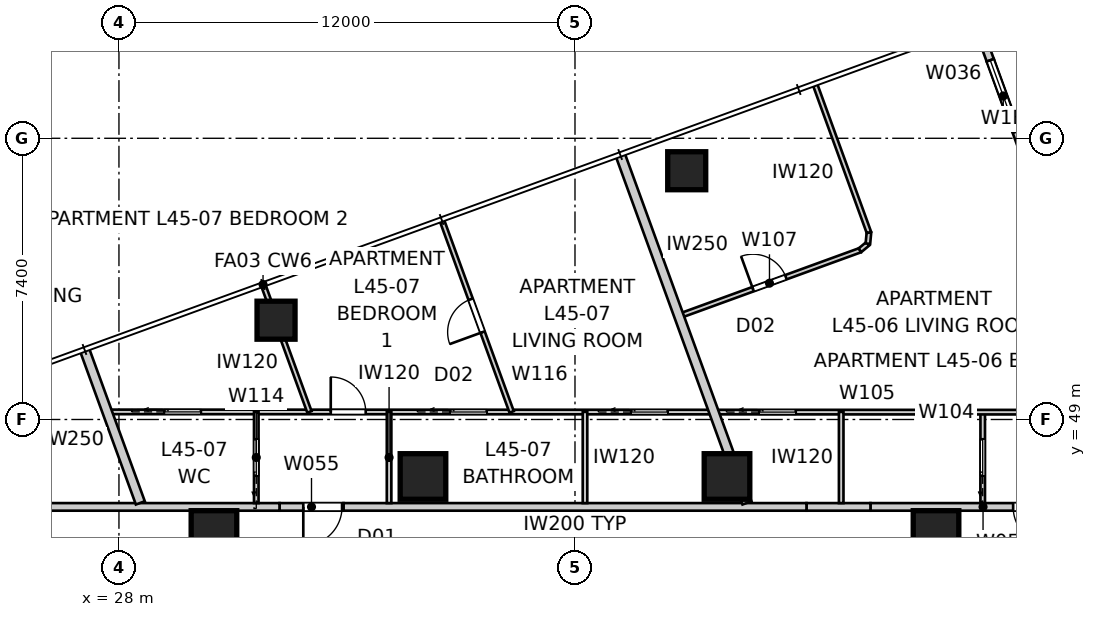
"""IFC4 building model, lengths in metres.
Left out: names, types, materials, properties, quantities, classifications, styles, units other than length and angle.
Written with IfcOpenShell. Run it as: python <this file> out.ifc"""

import sys

from ifc_helpers import new_model, si_unit, direction, frame, frame_2d, origin, origin_2d, place, context, subcontext, project, spatial, rectangle, extrude, element, fill, save


model = new_model("IFC4")
c1 = context("Model", 3, precision=1e-05, world=origin(), true_north=direction((0.0, 1.0)))
c2 = subcontext(c1, "Body", "Model", "MODEL_VIEW")
j1 = project(units=[si_unit("LENGTHUNIT", "METRE"), si_unit("PLANEANGLEUNIT", "RADIAN")], contexts=[c1])
p1 = place(None, origin())
s1 = spatial("IfcSite", under=j1, at=p1, CompositionType="ELEMENT")
p2 = place(p1, origin())
s2 = spatial("IfcBuilding", under=s1, at=p2, CompositionType="ELEMENT")
p3 = place(p2, frame((0.0, 0.0, 164.2)))
s3 = spatial("IfcBuildingStorey", under=s2, at=p3, CompositionType="ELEMENT", Elevation=164.2)
for number, where, z_axis, x_axis in (
    (1, (42.94, 55.546, 0.0), (0.0, 0.0, 1.0), (1.0, 0.0, 0.0)),
    (2, (32.134, 51.613, 0.0), (0.0, 0.0, 1.0), (1.0, 0.0, 0.0)),
):
    element("IfcColumn", number, at=place(p3, frame(where, z_axis=z_axis, x_axis=x_axis)), inside=s3, PredefinedType="COLUMN", context=c2, shape_type="SweptSolid", body=[
        extrude(rectangle(XDim=1.0, YDim=1.0, at=origin_2d()), origin(), (0.0, 0.0, 1.0), 3.4),
    ])
for number, where, z_axis, x_axis in (
    (3, (49.5, 46.0, 0.0), (0.0, 0.0, 1.0), (1.0, 0.0, 0.0)),
    (4, (44.0, 47.5, 0.0), (0.0, 0.0, 1.0), (1.0, 0.0, 0.0)),
    (5, (36.0, 47.5, 0.0), (0.0, 0.0, 1.0), (1.0, 0.0, 0.0)),
    (6, (30.5, 46.0, 0.0), (0.0, 0.0, 1.0), (1.0, 0.0, 0.0)),
):
    element("IfcColumn", number, at=place(p3, frame(where, z_axis=z_axis, x_axis=x_axis)), inside=s3, PredefinedType="COLUMN", context=c2, shape_type="SweptSolid", body=[
        extrude(rectangle(XDim=1.2, YDim=1.2, at=origin_2d()), origin(), (0.0, 0.0, 1.0), 3.4),
    ])
p4 = place(p3, frame((51.953, 55.634, 0.0), z_axis=(0.0, 0.0, 1.0), x_axis=(-0.341965219194, 0.939712609717, 0.0)))
e7 = element("IfcWall", 7, at=p4, inside=s3, PredefinedType="SOLIDWALL", context=c2, shape_type="SweptSolid", body=[
    extrude(rectangle(XDim=3.0, YDim=0.2, at=frame_2d((1.5, 0.0))), origin(), (0.0, 0.0, 1.0), 2.722),
])
p5 = place(p4, frame((1.0, 0.0, 0.45)))
e8 = element("IfcOpeningElement", 8, at=p5, cuts=e7, PredefinedType="OPENING", context=c2, shape_type="SweptSolid", body=[
    extrude(rectangle(XDim=2.0, YDim=1.8, at=frame_2d((1.0, 0.9))), frame((0.0, 0.11, 0.0), z_axis=(0.0, -1.0, 0.0), x_axis=(1.0, 0.0, 0.0)), (0.0, 0.0, 1.0), 0.22),
])
p6 = place(p3, frame((50.927, 58.453, 0.0), z_axis=(0.0, 0.0, 1.0), x_axis=(-0.342037080957, 0.939686455819, 0.0)))
e9 = element("IfcWall", 9, at=p6, inside=s3, PredefinedType="SOLIDWALL", context=c2, shape_type="SweptSolid", body=[
    extrude(rectangle(XDim=1.0, YDim=0.2, at=frame_2d((0.5, 0.0))), origin(), (0.0, 0.0, 1.0), 3.25),
])
p7 = place(p3, frame((53.7, 46.7, 0.0), z_axis=(0.0, 0.0, 1.0), x_axis=(-1.0, 0.0, 0.0)))
e10 = element("IfcWall", 10, at=p7, inside=s3, PredefinedType="PARTITIONING", context=c2, shape_type="SweptSolid", body=[
    extrude(rectangle(XDim=5.925, YDim=0.2, at=frame_2d((2.962, 0.0))), origin(), (0.0, 0.0, 1.0), 3.25),
])
p8 = place(p7, frame((1.151, 0.0, 0.0)))
e11 = element("IfcOpeningElement", 11, at=p8, cuts=e10, PredefinedType="OPENING", context=c2, shape_type="SweptSolid", body=[
    extrude(rectangle(XDim=1.02, YDim=2.34, at=frame_2d((0.51, 1.17))), frame((0.0, 0.11, 0.0), z_axis=(0.0, -1.0, 0.0), x_axis=(1.0, 0.0, 0.0)), (0.0, 0.0, 1.0), 0.22),
])
p9 = place(p3, frame((47.775, 46.7, 0.0), z_axis=(0.0, 0.0, 1.0), x_axis=(-1.0, 0.0, 0.0)))
e12 = element("IfcWall", 12, at=p9, inside=s3, PredefinedType="PARTITIONING", context=c2, shape_type="SweptSolid", body=[
    extrude(rectangle(XDim=1.684, YDim=0.2, at=frame_2d((0.842, 0.0))), origin(), (0.0, 0.0, 1.0), 2.55),
])
p10 = place(p3, frame((46.092, 46.7, 0.0), z_axis=(0.0, 0.0, 1.0), x_axis=(-1.0, 0.0, 0.0)))
e13 = element("IfcWall", 13, at=p10, inside=s3, PredefinedType="PARTITIONING", context=c2, shape_type="SweptSolid", body=[
    extrude(rectangle(XDim=12.183, YDim=0.2, at=frame_2d((6.092, 0.0))), origin(), (0.0, 0.0, 1.0), 3.25),
])
p11 = place(p3, frame((33.908, 46.7, 0.0), z_axis=(0.0, 0.0, 1.0), x_axis=(-1.0, 0.0, 0.0)))
e14 = element("IfcWall", 14, at=p11, inside=s3, PredefinedType="PARTITIONING", context=c2, shape_type="SweptSolid", body=[
    extrude(rectangle(XDim=1.684, YDim=0.2, at=frame_2d((0.842, 0.0))), origin(), (0.0, 0.0, 1.0), 2.55),
])
p12 = place(p11, frame((0.038, 0.0, 0.0)))
e15 = element("IfcOpeningElement", 15, at=p12, cuts=e14, PredefinedType="OPENING", context=c2, shape_type="SweptSolid", body=[
    extrude(rectangle(XDim=1.02, YDim=2.34, at=frame_2d((0.51, 1.17))), frame((0.0, 0.11, 0.0), z_axis=(0.0, -1.0, 0.0), x_axis=(1.0, 0.0, 0.0)), (0.0, 0.0, 1.0), 0.22),
])
p13 = place(p3, frame((32.225, 46.7, 0.0), z_axis=(0.0, 0.0, 1.0), x_axis=(-1.0, 0.0, 0.0)))
e16 = element("IfcWall", 16, at=p13, inside=s3, PredefinedType="PARTITIONING", context=c2, shape_type="SweptSolid", body=[
    extrude(rectangle(XDim=6.725, YDim=0.2, at=frame_2d((3.362, 0.0))), origin(), (0.0, 0.0, 1.0), 3.25),
])
p14 = place(p3, frame((41.188, 55.973, 0.0), z_axis=(0.0, 0.0, 1.0), x_axis=(0.342010282049, -0.939696209938, 0.0)))
e17 = element("IfcWall", 17, at=p14, inside=s3, PredefinedType="PARTITIONING", context=c2, shape_type="SweptSolid", body=[
    extrude(rectangle(XDim=9.756, YDim=0.25, at=frame_2d((4.878, 0.0))), origin(), (0.0, 0.0, 1.0), 3.25),
])
p15 = place(p3, frame((27.093, 50.843, 0.0), z_axis=(0.0, 0.0, 1.0), x_axis=(0.3420213594, -0.93969217817, 0.0)))
e18 = element("IfcWall", 18, at=p15, inside=s3, PredefinedType="PARTITIONING", context=c2, shape_type="SweptSolid", body=[
    extrude(rectangle(XDim=4.296, YDim=0.25, at=frame_2d((2.148, 0.0))), origin(), (0.0, 0.0, 1.0), 3.25),
])
p16 = place(p3, frame((50.729, 46.8, 0.0), z_axis=(0.0, 0.0, 1.0), x_axis=(0.0, 1.0, 0.0)))
e19 = element("IfcWall", 19, at=p16, inside=s3, PredefinedType="PARTITIONING", context=c2, shape_type="SweptSolid", body=[
    extrude(rectangle(XDim=2.4, YDim=0.12, at=frame_2d((1.2, 0.0))), origin(), (0.0, 0.0, 1.0), 3.25),
])
p17 = place(p16, frame((0.72, 0.0, 0.0)))
e20 = element("IfcOpeningElement", 20, at=p17, cuts=e19, PredefinedType="OPENING", context=c2, shape_type="SweptSolid", body=[
    extrude(rectangle(XDim=0.96, YDim=2.1, at=frame_2d((0.48, 1.05))), frame((0.0, 0.07, 0.0), z_axis=(0.0, -1.0, 0.0), x_axis=(1.0, 0.0, 0.0)), (0.0, 0.0, 1.0), 0.14),
])
p18 = place(p3, frame((27.691, 49.2, 0.0), z_axis=(0.0, 0.0, 1.0), x_axis=(0.999999952285, -0.000308918217, 0.0)))
e21 = element("IfcWall", 21, at=p18, inside=s3, PredefinedType="PARTITIONING", context=c2, shape_type="SweptSolid", body=[
    extrude(rectangle(XDim=30.822, YDim=0.12, at=frame_2d((15.411, 0.0))), origin(), (0.0, 0.0, 1.0), 3.25),
])
p19 = place(p18, frame((5.882, 0.0, 0.0)))
e22 = element("IfcOpeningElement", 22, at=p19, cuts=e21, PredefinedType="OPENING", context=c2, shape_type="SweptSolid", body=[
    extrude(rectangle(XDim=0.92, YDim=2.34, at=frame_2d((0.46, 1.17))), frame((0.0, 0.07, 0.0), z_axis=(0.0, -1.0, 0.0), x_axis=(1.0, 0.0, 0.0)), (0.0, 0.0, 1.0), 0.14),
])
p20 = place(p18, frame((28.07, 0.0, 0.0)))
e23 = element("IfcOpeningElement", 23, at=p20, cuts=e21, PredefinedType="OPENING", context=c2, shape_type="SweptSolid", body=[
    extrude(rectangle(XDim=0.92, YDim=2.34, at=frame_2d((0.46, 1.17))), frame((0.0, 0.07, 0.0), z_axis=(0.0, -1.0, 0.0), x_axis=(1.0, 0.0, 0.0)), (0.0, 0.0, 1.0), 0.14),
])
p21 = place(p18, frame((24.388, 0.0, 0.0)))
e24 = element("IfcOpeningElement", 24, at=p21, cuts=e21, PredefinedType="OPENING", context=c2, shape_type="SweptSolid", body=[
    extrude(rectangle(XDim=0.92, YDim=2.34, at=frame_2d((0.46, 1.17))), frame((0.0, 0.07, 0.0), z_axis=(0.0, -1.0, 0.0), x_axis=(1.0, 0.0, 0.0)), (0.0, 0.0, 1.0), 0.14),
])
p22 = place(p18, frame((1.506, 0.0, 0.0)))
e25 = element("IfcOpeningElement", 25, at=p22, cuts=e21, PredefinedType="OPENING", context=c2, shape_type="SweptSolid", body=[
    extrude(rectangle(XDim=0.96, YDim=2.1, at=frame_2d((0.48, 1.05))), frame((0.0, 0.07, 0.0), z_axis=(0.0, -1.0, 0.0), x_axis=(1.0, 0.0, 0.0)), (0.0, 0.0, 1.0), 0.14),
])
p23 = place(p18, frame((17.158, 0.0, 0.0)))
e26 = element("IfcOpeningElement", 26, at=p23, cuts=e21, PredefinedType="OPENING", context=c2, shape_type="SweptSolid", body=[
    extrude(rectangle(XDim=0.96, YDim=2.1, at=frame_2d((0.48, 1.05))), frame((0.0, 0.07, 0.0), z_axis=(0.0, -1.0, 0.0), x_axis=(1.0, 0.0, 0.0)), (0.0, 0.0, 1.0), 0.14),
])
p24 = place(p18, frame((9.026, 0.0, 0.0)))
e27 = element("IfcOpeningElement", 27, at=p24, cuts=e21, PredefinedType="OPENING", context=c2, shape_type="SweptSolid", body=[
    extrude(rectangle(XDim=0.96, YDim=2.1, at=frame_2d((0.48, 1.05))), frame((0.0, 0.07, 0.0), z_axis=(0.0, -1.0, 0.0), x_axis=(1.0, 0.0, 0.0)), (0.0, 0.0, 1.0), 0.14),
])
p25 = place(p18, frame((13.788, 0.0, 0.0)))
e28 = element("IfcOpeningElement", 28, at=p25, cuts=e21, PredefinedType="OPENING", context=c2, shape_type="SweptSolid", body=[
    extrude(rectangle(XDim=0.96, YDim=2.1, at=frame_2d((0.48, 1.05))), frame((0.0, 0.07, 0.0), z_axis=(0.0, -1.0, 0.0), x_axis=(1.0, 0.0, 0.0)), (0.0, 0.0, 1.0), 0.14),
])
p26 = place(p3, frame((47.005, 46.8, 0.0), z_axis=(0.0, 0.0, 1.0), x_axis=(0.0, 1.0, 0.0)))
e29 = element("IfcWall", 29, at=p26, inside=s3, PredefinedType="PARTITIONING", context=c2, shape_type="SweptSolid", body=[
    extrude(rectangle(XDim=2.4, YDim=0.12, at=frame_2d((1.2, 0.0))), origin(), (0.0, 0.0, 1.0), 3.25),
])
p27 = place(p3, frame((42.736, 51.72, 0.0), z_axis=(0.0, 0.0, 1.0), x_axis=(0.939707596988, 0.341978993747, 0.0)))
e30 = element("IfcWall", 30, at=p27, inside=s3, PredefinedType="PARTITIONING", context=c2, shape_type="SweptSolid", body=[
    extrude(rectangle(XDim=5.068, YDim=0.12, at=frame_2d((2.534, 0.0))), origin(), (0.0, 0.0, 1.0), 3.25),
])
p28 = place(p27, frame((2.074, 0.0, 0.0)))
e31 = element("IfcOpeningElement", 31, at=p28, cuts=e30, PredefinedType="OPENING", context=c2, shape_type="SweptSolid", body=[
    extrude(rectangle(XDim=0.92, YDim=2.34, at=frame_2d((0.46, 1.17))), frame((0.0, 0.07, 0.0), z_axis=(0.0, -1.0, 0.0), x_axis=(1.0, 0.0, 0.0)), (0.0, 0.0, 1.0), 0.14),
])
p29 = place(p3, frame((47.499, 53.453, 0.0), z_axis=(0.0, 0.0, 1.0), x_axis=(0.769326440299, 0.638855874401, 0.0)))
e32 = element("IfcWall", 32, at=p29, inside=s3, PredefinedType="PARTITIONING", context=c2, shape_type="SweptSolid", body=[
    extrude(rectangle(XDim=0.271, YDim=0.12, at=frame_2d((0.136, 0.0))), origin(), (0.0, 0.0, 1.0), 3.25),
])
p30 = place(p3, frame((47.708, 53.627, 0.0), z_axis=(0.0, 0.0, 1.0), x_axis=(0.092395121176, 0.995722421955, 0.0)))
e33 = element("IfcWall", 33, at=p30, inside=s3, PredefinedType="PARTITIONING", context=c2, shape_type="SweptSolid", body=[
    extrude(rectangle(XDim=0.296, YDim=0.12, at=frame_2d((0.148, 0.0))), origin(), (0.0, 0.0, 1.0), 3.25),
])
p31 = place(p3, frame((47.735, 53.921, 0.0), z_axis=(0.0, 0.0, 1.0), x_axis=(-0.342004304159, 0.93969838562, 0.0)))
e34 = element("IfcWall", 34, at=p31, inside=s3, PredefinedType="PARTITIONING", context=c2, shape_type="SweptSolid", body=[
    extrude(rectangle(XDim=4.127, YDim=0.12, at=frame_2d((2.063, 0.0))), origin(), (0.0, 0.0, 1.0), 3.25),
])
p32 = place(p3, frame((35.108, 49.2, 0.0), z_axis=(0.0, 0.0, 1.0), x_axis=(0.0, -1.0, 0.0)))
e35 = element("IfcWall", 35, at=p32, inside=s3, PredefinedType="PARTITIONING", context=c2, shape_type="SweptSolid", body=[
    extrude(rectangle(XDim=2.4, YDim=0.12, at=frame_2d((1.2, 0.0))), origin(), (0.0, 0.0, 1.0), 3.25),
])
p33 = place(p3, frame((31.613, 46.8, 0.0), z_axis=(0.0, 0.0, 1.0), x_axis=(0.0, 1.0, 0.0)))
e36 = element("IfcWall", 36, at=p33, inside=s3, PredefinedType="PARTITIONING", context=c2, shape_type="SweptSolid", body=[
    extrude(rectangle(XDim=2.4, YDim=0.12, at=frame_2d((1.2, 0.0))), origin(), (0.0, 0.0, 1.0), 3.25),
])
p34 = place(p33, frame((0.72, 0.0, 0.0)))
e37 = element("IfcOpeningElement", 37, at=p34, cuts=e36, PredefinedType="OPENING", context=c2, shape_type="SweptSolid", body=[
    extrude(rectangle(XDim=0.96, YDim=2.1, at=frame_2d((0.48, 1.05))), frame((0.0, 0.07, 0.0), z_axis=(0.0, -1.0, 0.0), x_axis=(1.0, 0.0, 0.0)), (0.0, 0.0, 1.0), 0.14),
])
p35 = place(p3, frame((40.263, 49.2, 0.0), z_axis=(0.0, 0.0, 1.0), x_axis=(0.0, -1.0, 0.0)))
e38 = element("IfcWall", 38, at=p35, inside=s3, PredefinedType="PARTITIONING", context=c2, shape_type="SweptSolid", body=[
    extrude(rectangle(XDim=2.4, YDim=0.12, at=frame_2d((1.2, 0.0))), origin(), (0.0, 0.0, 1.0), 3.25),
])
p36 = place(p3, frame((38.333, 49.2, 0.0), z_axis=(0.0, 0.0, 1.0), x_axis=(-0.341995981916, 0.939701414468, 0.0)))
e39 = element("IfcWall", 39, at=p36, inside=s3, PredefinedType="PARTITIONING", context=c2, shape_type="SweptSolid", body=[
    extrude(rectangle(XDim=5.348, YDim=0.12, at=frame_2d((2.674, 0.0))), origin(), (0.0, 0.0, 1.0), 3.25),
])
p37 = place(p36, frame((2.234, 0.0, 0.0)))
e40 = element("IfcOpeningElement", 40, at=p37, cuts=e39, PredefinedType="OPENING", context=c2, shape_type="SweptSolid", body=[
    extrude(rectangle(XDim=0.92, YDim=2.34, at=frame_2d((0.46, 1.17))), frame((0.0, 0.07, 0.0), z_axis=(0.0, -1.0, 0.0), x_axis=(1.0, 0.0, 0.0)), (0.0, 0.0, 1.0), 0.14),
])
p38 = place(p3, frame((33.012, 49.2, 0.0), z_axis=(0.0, 0.0, 1.0), x_axis=(-0.341998645001, 0.939700445258, 0.0)))
e41 = element("IfcWall", 41, at=p38, inside=s3, PredefinedType="PARTITIONING", context=c2, shape_type="SweptSolid", body=[
    extrude(rectangle(XDim=3.528, YDim=0.12, at=frame_2d((1.764, 0.0))), origin(), (0.0, 0.0, 1.0), 3.25),
])
p39 = place(p5, origin())
e42 = element("IfcWindow", 42, at=p39, inside=s3, PartitioningType="SINGLE_PANEL", PredefinedType="WINDOW", context=c2, shape_type="SweptSolid", body=[
    extrude(rectangle(XDim=2.0, YDim=1.8, at=frame_2d((1.0, 0.9))), frame((0.0, 0.03, 0.0), z_axis=(0.0, -1.0, 0.0), x_axis=(1.0, 0.0, 0.0)), (0.0, 0.0, 1.0), 0.06),
])
fill(e8, e42)
p40 = place(p12, origin())
e43 = element("IfcDoor", 43, at=p40, inside=s3, OperationType="SINGLE_SWING_RIGHT", PredefinedType="DOOR", context=c2, shape_type="SweptSolid", body=[
    extrude(rectangle(XDim=1.02, YDim=2.34, at=frame_2d((0.51, 1.17))), frame((0.0, 0.025, 0.0), z_axis=(0.0, -1.0, 0.0), x_axis=(1.0, 0.0, 0.0)), (0.0, 0.0, 1.0), 0.05),
])
fill(e15, e43)
p41 = place(p8, origin())
e44 = element("IfcDoor", 44, at=p41, inside=s3, OperationType="SINGLE_SWING_LEFT", PredefinedType="DOOR", context=c2, shape_type="SweptSolid", body=[
    extrude(rectangle(XDim=1.02, YDim=2.34, at=frame_2d((0.51, 1.17))), frame((0.0, 0.025, 0.0), z_axis=(0.0, -1.0, 0.0), x_axis=(1.0, 0.0, 0.0)), (0.0, 0.0, 1.0), 0.05),
])
fill(e11, e44)
p42 = place(p34, origin())
e45 = element("IfcDoor", 45, at=p42, inside=s3, OperationType="SLIDING_TO_LEFT", PredefinedType="DOOR", context=c2, shape_type="SweptSolid", body=[
    extrude(rectangle(XDim=0.96, YDim=2.1, at=frame_2d((0.48, 1.05))), frame((0.0, 0.025, 0.0), z_axis=(0.0, -1.0, 0.0), x_axis=(1.0, 0.0, 0.0)), (0.0, 0.0, 1.0), 0.05),
])
fill(e37, e45)
p43 = place(p19, origin())
e46 = element("IfcDoor", 46, at=p43, inside=s3, OperationType="SINGLE_SWING_LEFT", PredefinedType="DOOR", context=c2, shape_type="SweptSolid", body=[
    extrude(rectangle(XDim=0.92, YDim=2.34, at=frame_2d((0.46, 1.17))), frame((0.0, 0.025, 0.0), z_axis=(0.0, -1.0, 0.0), x_axis=(1.0, 0.0, 0.0)), (0.0, 0.0, 1.0), 0.05),
])
fill(e22, e46)
p44 = place(p17, origin())
e47 = element("IfcDoor", 47, at=p44, inside=s3, OperationType="SLIDING_TO_LEFT", PredefinedType="DOOR", context=c2, shape_type="SweptSolid", body=[
    extrude(rectangle(XDim=0.96, YDim=2.1, at=frame_2d((0.48, 1.05))), frame((0.0, 0.025, 0.0), z_axis=(0.0, -1.0, 0.0), x_axis=(1.0, 0.0, 0.0)), (0.0, 0.0, 1.0), 0.05),
])
fill(e20, e47)
p45 = place(p22, origin())
e48 = element("IfcDoor", 48, at=p45, inside=s3, OperationType="SLIDING_TO_LEFT", PredefinedType="DOOR", context=c2, shape_type="SweptSolid", body=[
    extrude(rectangle(XDim=0.96, YDim=2.1, at=frame_2d((0.48, 1.05))), frame((0.0, 0.025, 0.0), z_axis=(0.0, -1.0, 0.0), x_axis=(1.0, 0.0, 0.0)), (0.0, 0.0, 1.0), 0.05),
])
fill(e25, e48)
p46 = place(p28, origin())
e49 = element("IfcDoor", 49, at=p46, inside=s3, OperationType="SINGLE_SWING_LEFT", PredefinedType="DOOR", context=c2, shape_type="SweptSolid", body=[
    extrude(rectangle(XDim=0.92, YDim=2.34, at=frame_2d((0.46, 1.17))), frame((0.0, 0.025, 0.0), z_axis=(0.0, -1.0, 0.0), x_axis=(1.0, 0.0, 0.0)), (0.0, 0.0, 1.0), 0.05),
])
fill(e31, e49)
p47 = place(p23, origin())
e50 = element("IfcDoor", 50, at=p47, inside=s3, OperationType="SLIDING_TO_LEFT", PredefinedType="DOOR", context=c2, shape_type="SweptSolid", body=[
    extrude(rectangle(XDim=0.96, YDim=2.1, at=frame_2d((0.48, 1.05))), frame((0.0, 0.025, 0.0), z_axis=(0.0, -1.0, 0.0), x_axis=(1.0, 0.0, 0.0)), (0.0, 0.0, 1.0), 0.05),
])
fill(e26, e50)
p48 = place(p37, origin())
e51 = element("IfcDoor", 51, at=p48, inside=s3, OperationType="SINGLE_SWING_LEFT", PredefinedType="DOOR", context=c2, shape_type="SweptSolid", body=[
    extrude(rectangle(XDim=0.92, YDim=2.34, at=frame_2d((0.46, 1.17))), frame((0.0, 0.025, 0.0), z_axis=(0.0, -1.0, 0.0), x_axis=(1.0, 0.0, 0.0)), (0.0, 0.0, 1.0), 0.05),
])
fill(e40, e51)
p49 = place(p24, origin())
e52 = element("IfcDoor", 52, at=p49, inside=s3, OperationType="SLIDING_TO_LEFT", PredefinedType="DOOR", context=c2, shape_type="SweptSolid", body=[
    extrude(rectangle(XDim=0.96, YDim=2.1, at=frame_2d((0.48, 1.05))), frame((0.0, 0.025, 0.0), z_axis=(0.0, -1.0, 0.0), x_axis=(1.0, 0.0, 0.0)), (0.0, 0.0, 1.0), 0.05),
])
fill(e27, e52)
p50 = place(p25, origin())
e53 = element("IfcDoor", 53, at=p50, inside=s3, OperationType="SLIDING_TO_LEFT", PredefinedType="DOOR", context=c2, shape_type="SweptSolid", body=[
    extrude(rectangle(XDim=0.96, YDim=2.1, at=frame_2d((0.48, 1.05))), frame((0.0, 0.025, 0.0), z_axis=(0.0, -1.0, 0.0), x_axis=(1.0, 0.0, 0.0)), (0.0, 0.0, 1.0), 0.05),
])
fill(e28, e53)
save(model, sys.argv[1])
